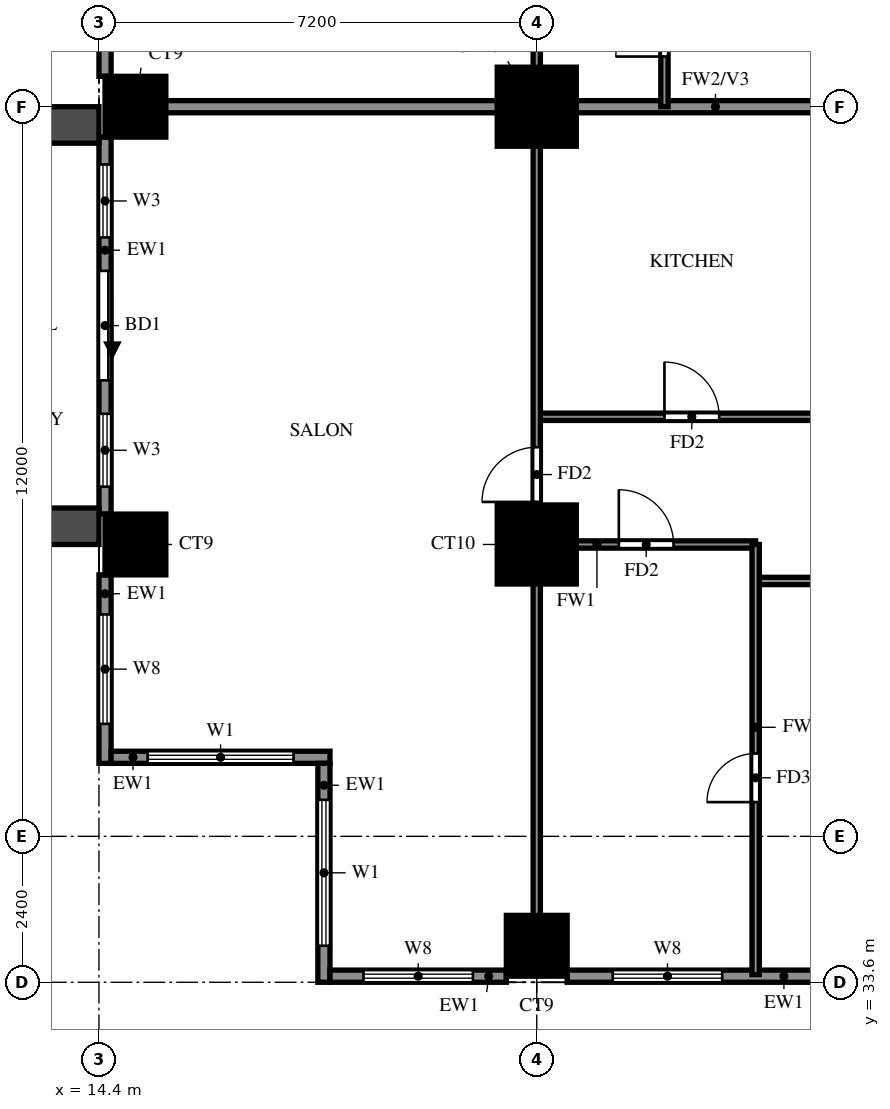
"""IFC4 building model, lengths in metres.
Left out: names, types, materials, properties, quantities, classifications, styles, units other than length and angle.
Written with IfcOpenShell. Run it as: python <this file> out.ifc"""

import sys

from ifc_helpers import new_model, si_unit, direction, frame, frame_2d, origin, origin_2d, place, context, subcontext, project, spatial, rectangle, extrude, source, transform, mapped, element, fill, save


model = new_model("IFC4")
c1 = context("Model", 3, precision=1e-05, world=origin(), true_north=direction((0.0, 1.0)))
c2 = subcontext(c1, "Body", "Model", "MODEL_VIEW")
j1 = project(units=[si_unit("LENGTHUNIT", "METRE"), si_unit("PLANEANGLEUNIT", "RADIAN")], contexts=[c1])
p1 = place(None, origin())
s1 = spatial("IfcSite", under=j1, at=p1, CompositionType="ELEMENT")
p2 = place(p1, origin())
s2 = spatial("IfcBuilding", under=s1, at=p2, CompositionType="ELEMENT")
p3 = place(p2, frame((0.0, 0.0, 90.0)))
s3 = spatial("IfcBuildingStorey", under=s2, at=p3, CompositionType="ELEMENT", Elevation=90.0)
m1 = source(origin(), c2, "Body", "SweptSolid", [
    extrude(rectangle(XDim=1.0, YDim=1.0, at=origin_2d()), origin(), (0.0, 0.0, 1.0), 3.18),
])
for number, where, z_axis, x_axis in (
    (1, (21.6, 34.2, 0.0), (0.0, 0.0, 1.0), (1.0, 0.0, 0.0)),
    (2, (15.0, 40.8, 0.0), (0.0, 0.0, 1.0), (1.0, 0.0, 0.0)),
):
    element("IfcColumn", number, at=place(p3, frame(where, z_axis=z_axis, x_axis=x_axis)), inside=s3, PredefinedType="COLUMN", context=c2, shape_type="MappedRepresentation", body=[
        mapped(m1, transform((0.0, 0.0, 0.0))),
    ])
m2 = source(origin(), c2, "Body", "SweptSolid", [
    extrude(rectangle(XDim=1.3, YDim=1.3, at=origin_2d()), origin(), (0.0, 0.0, 1.0), 3.18),
])
p4 = place(p3, frame((21.6, 40.8, 0.0), z_axis=(0.0, 0.0, 1.0), x_axis=(1.0, 0.0, 0.0)))
e3 = element("IfcColumn", 3, at=p4, inside=s3, PredefinedType="COLUMN", context=c2, shape_type="MappedRepresentation", body=[
    mapped(m2, transform((0.0, 0.0, 0.0))),
])
p5 = place(p3, frame((15.0, 48.0, 0.0), z_axis=(0.0, 0.0, 1.0), x_axis=(1.0, 0.0, 0.0)))
e4 = element("IfcColumn", 4, at=p5, inside=s3, PredefinedType="COLUMN", context=c2, shape_type="MappedRepresentation", body=[
    mapped(m1, transform((0.0, 0.0, 0.0))),
])
p6 = place(p3, frame((21.6, 48.0, 0.0), z_axis=(0.0, 0.0, 1.0), x_axis=(1.0, 0.0, 0.0)))
e5 = element("IfcColumn", 5, at=p6, inside=s3, PredefinedType="COLUMN", context=c2, shape_type="MappedRepresentation", body=[
    mapped(m2, transform((0.0, 0.0, 0.0))),
])
p7 = place(p3, frame((14.5, 54.7, 0.0), z_axis=(0.0, 0.0, 1.0), x_axis=(0.0, -1.0, 0.0)))
e6 = element("IfcWall", 6, at=p7, inside=s3, PredefinedType="SOLIDWALL", context=c2, shape_type="SweptSolid", body=[
    extrude(rectangle(XDim=6.2, YDim=0.2, at=frame_2d((3.1, 0.0))), origin(), (0.0, 0.0, 1.0), 3.18),
])
p8 = place(p7, frame((3.65, 0.0, 0.6)))
e7 = element("IfcOpeningElement", 7, at=p8, cuts=e6, PredefinedType="OPENING", context=c2, shape_type="SweptSolid", body=[
    extrude(rectangle(XDim=1.8, YDim=2.4, at=frame_2d((0.9, 1.2))), frame((0.0, 0.11, 0.0), z_axis=(0.0, -1.0, 0.0), x_axis=(1.0, 0.0, 0.0)), (0.0, 0.0, 1.0), 0.22),
])
p9 = place(p7, frame((0.75, 0.0, 0.6)))
e8 = element("IfcOpeningElement", 8, at=p9, cuts=e6, PredefinedType="OPENING", context=c2, shape_type="SweptSolid", body=[
    extrude(rectangle(XDim=1.8, YDim=2.4, at=frame_2d((0.9, 1.2))), frame((0.0, 0.11, 0.0), z_axis=(0.0, -1.0, 0.0), x_axis=(1.0, 0.0, 0.0)), (0.0, 0.0, 1.0), 0.22),
])
p10 = place(p3, frame((14.5, 47.5, 0.0), z_axis=(0.0, 0.0, 1.0), x_axis=(0.0, -1.0, 0.0)))
e9 = element("IfcWall", 9, at=p10, inside=s3, PredefinedType="SOLIDWALL", context=c2, shape_type="SweptSolid", body=[
    extrude(rectangle(XDim=6.2, YDim=0.2, at=frame_2d((3.1, 0.0))), origin(), (0.0, 0.0, 1.0), 3.18),
])
p11 = place(p10, frame((2.2, 0.0, 0.0)))
e10 = element("IfcOpeningElement", 10, at=p11, cuts=e9, PredefinedType="OPENING", context=c2, shape_type="SweptSolid", body=[
    extrude(rectangle(XDim=1.8, YDim=2.4, at=frame_2d((0.9, 1.2))), frame((0.0, 0.11, 0.0), z_axis=(0.0, -1.0, 0.0), x_axis=(1.0, 0.0, 0.0)), (0.0, 0.0, 1.0), 0.22),
])
p12 = place(p10, frame((0.45, 0.0, 0.6)))
e11 = element("IfcOpeningElement", 11, at=p12, cuts=e9, PredefinedType="OPENING", context=c2, shape_type="SweptSolid", body=[
    extrude(rectangle(XDim=1.2, YDim=2.4, at=frame_2d((0.6, 1.2))), frame((0.0, 0.11, 0.0), z_axis=(0.0, -1.0, 0.0), x_axis=(1.0, 0.0, 0.0)), (0.0, 0.0, 1.0), 0.22),
])
p13 = place(p10, frame((4.55, 0.0, 0.6)))
e12 = element("IfcOpeningElement", 12, at=p13, cuts=e9, PredefinedType="OPENING", context=c2, shape_type="SweptSolid", body=[
    extrude(rectangle(XDim=1.2, YDim=2.4, at=frame_2d((0.6, 1.2))), frame((0.0, 0.11, 0.0), z_axis=(0.0, -1.0, 0.0), x_axis=(1.0, 0.0, 0.0)), (0.0, 0.0, 1.0), 0.22),
])
p14 = place(p3, frame((14.5, 40.3, 0.0), z_axis=(0.0, 0.0, 1.0), x_axis=(0.0, -1.0, 0.0)))
e13 = element("IfcWall", 13, at=p14, inside=s3, PredefinedType="SOLIDWALL", context=c2, shape_type="SweptSolid", body=[
    extrude(rectangle(XDim=3.1, YDim=0.2, at=frame_2d((1.55, 0.0))), origin(), (0.0, 0.0, 1.0), 3.18),
])
p15 = place(p14, frame((0.65, 0.0, 0.6)))
e14 = element("IfcOpeningElement", 14, at=p15, cuts=e13, PredefinedType="OPENING", context=c2, shape_type="SweptSolid", body=[
    extrude(rectangle(XDim=1.8, YDim=2.4, at=frame_2d((0.9, 1.2))), frame((0.0, 0.11, 0.0), z_axis=(0.0, -1.0, 0.0), x_axis=(1.0, 0.0, 0.0)), (0.0, 0.0, 1.0), 0.22),
])
p16 = place(p3, frame((14.6, 37.3, 0.0), z_axis=(0.0, 0.0, 1.0), x_axis=(1.0, 0.0, 0.0)))
e15 = element("IfcWall", 15, at=p16, inside=s3, PredefinedType="SOLIDWALL", context=c2, shape_type="SweptSolid", body=[
    extrude(rectangle(XDim=3.6, YDim=0.2, at=frame_2d((1.8, 0.0))), origin(), (0.0, 0.0, 1.0), 3.18),
])
p17 = place(p16, frame((0.6, 0.0, 0.6)))
e16 = element("IfcOpeningElement", 16, at=p17, cuts=e15, PredefinedType="OPENING", context=c2, shape_type="SweptSolid", body=[
    extrude(rectangle(XDim=2.4, YDim=2.4, at=frame_2d((1.2, 1.2))), frame((0.0, 0.11, 0.0), z_axis=(0.0, -1.0, 0.0), x_axis=(1.0, 0.0, 0.0)), (0.0, 0.0, 1.0), 0.22),
])
p18 = place(p3, frame((18.1, 37.2, 0.0), z_axis=(0.0, 0.0, 1.0), x_axis=(0.0, -1.0, 0.0)))
e17 = element("IfcWall", 17, at=p18, inside=s3, PredefinedType="SOLIDWALL", context=c2, shape_type="SweptSolid", body=[
    extrude(rectangle(XDim=3.6, YDim=0.2, at=frame_2d((1.8, 0.0))), origin(), (0.0, 0.0, 1.0), 3.18),
])
p19 = place(p18, frame((0.6, 0.0, 0.6)))
e18 = element("IfcOpeningElement", 18, at=p19, cuts=e17, PredefinedType="OPENING", context=c2, shape_type="SweptSolid", body=[
    extrude(rectangle(XDim=2.4, YDim=2.4, at=frame_2d((1.2, 1.2))), frame((0.0, 0.11, 0.0), z_axis=(0.0, -1.0, 0.0), x_axis=(1.0, 0.0, 0.0)), (0.0, 0.0, 1.0), 0.22),
])
p20 = place(p3, frame((18.2, 33.7, 0.0), z_axis=(0.0, 0.0, 1.0), x_axis=(1.0, 0.0, 0.0)))
e19 = element("IfcWall", 19, at=p20, inside=s3, PredefinedType="SOLIDWALL", context=c2, shape_type="SweptSolid", body=[
    extrude(rectangle(XDim=2.9, YDim=0.2, at=frame_2d((1.45, 0.0))), origin(), (0.0, 0.0, 1.0), 3.18),
])
p21 = place(p20, frame((0.55, 0.0, 0.6)))
e20 = element("IfcOpeningElement", 20, at=p21, cuts=e19, PredefinedType="OPENING", context=c2, shape_type="SweptSolid", body=[
    extrude(rectangle(XDim=1.8, YDim=2.4, at=frame_2d((0.9, 1.2))), frame((0.0, 0.11, 0.0), z_axis=(0.0, -1.0, 0.0), x_axis=(1.0, 0.0, 0.0)), (0.0, 0.0, 1.0), 0.22),
])
p22 = place(p3, frame((22.1, 33.7, 0.0), z_axis=(0.0, 0.0, 1.0), x_axis=(1.0, 0.0, 0.0)))
e21 = element("IfcWall", 21, at=p22, inside=s3, PredefinedType="SOLIDWALL", context=c2, shape_type="SweptSolid", body=[
    extrude(rectangle(XDim=6.2, YDim=0.2, at=frame_2d((3.1, 0.0))), origin(), (0.0, 0.0, 1.0), 3.18),
])
p23 = place(p22, frame((0.75, 0.0, 0.6)))
e22 = element("IfcOpeningElement", 22, at=p23, cuts=e21, PredefinedType="OPENING", context=c2, shape_type="SweptSolid", body=[
    extrude(rectangle(XDim=1.8, YDim=2.4, at=frame_2d((0.9, 1.2))), frame((0.0, 0.11, 0.0), z_axis=(0.0, -1.0, 0.0), x_axis=(1.0, 0.0, 0.0)), (0.0, 0.0, 1.0), 0.22),
])
p24 = place(p22, frame((4.1, 0.0, 1.5)))
e23 = element("IfcOpeningElement", 23, at=p24, cuts=e21, PredefinedType="OPENING", context=c2, shape_type="SweptSolid", body=[
    extrude(rectangle(XDim=0.9, YDim=0.9, at=frame_2d((0.45, 0.45))), frame((0.0, 0.11, 0.0), z_axis=(0.0, -1.0, 0.0), x_axis=(1.0, 0.0, 0.0)), (0.0, 0.0, 1.0), 0.22),
])
for number, where, z_axis, x_axis in (
    (24, (14.4, 47.7, 0.0), (0.0, 0.0, 1.0), (-1.0, 0.0, 0.0)),
    (25, (14.4, 41.1, 0.0), (0.0, 0.0, 1.0), (-1.0, 0.0, 0.0)),
):
    element("IfcWall", number, at=place(p3, frame(where, z_axis=z_axis, x_axis=x_axis)), inside=s3, PredefinedType="SOLIDWALL", context=c2, shape_type="SweptSolid", body=[
        extrude(rectangle(XDim=2.7, YDim=0.6, at=frame_2d((1.35, 0.0))), origin(), (0.0, 0.0, 1.0), 2.85),
    ])
p25 = place(p3, frame((14.525, 48.0, 0.0), z_axis=(0.0, 0.0, 1.0), x_axis=(1.0, 0.0, 0.0)))
e26 = element("IfcWall", 26, at=p25, inside=s3, PredefinedType="SOLIDWALL", context=c2, shape_type="SweptSolid", body=[
    extrude(rectangle(XDim=19.075, YDim=0.2, at=frame_2d((9.538, 0.0))), origin(), (0.0, 0.0, 1.0), 3.18),
])
p26 = place(p3, frame((25.2, 40.2, 0.0), z_axis=(0.0, 0.0, 1.0), x_axis=(1.0, 0.0, 0.0)))
e27 = element("IfcWall", 27, at=p26, inside=s3, PredefinedType="PARTITIONING", context=c2, shape_type="SweptSolid", body=[
    extrude(rectangle(XDim=3.6, YDim=0.12, at=frame_2d((1.8, 0.0))), origin(), (0.0, 0.0, 1.0), 3.18),
])
p27 = place(p3, frame((21.6, 40.8, 0.0), z_axis=(0.0, 0.0, 1.0), x_axis=(1.0, 0.0, 0.0)))
e28 = element("IfcWall", 28, at=p27, inside=s3, PredefinedType="PARTITIONING", context=c2, shape_type="SweptSolid", body=[
    extrude(rectangle(XDim=3.6, YDim=0.12, at=frame_2d((1.8, 0.0))), origin(), (0.0, 0.0, 1.0), 3.18),
])
p28 = place(p27, frame((1.35, 0.0, 0.0)))
e29 = element("IfcOpeningElement", 29, at=p28, cuts=e28, PredefinedType="OPENING", context=c2, shape_type="SweptSolid", body=[
    extrude(rectangle(XDim=0.9, YDim=2.1, at=frame_2d((0.45, 1.05))), frame((0.0, 0.07, 0.0), z_axis=(0.0, -1.0, 0.0), x_axis=(1.0, 0.0, 0.0)), (0.0, 0.0, 1.0), 0.14),
])
p29 = place(p3, frame((21.6, 42.9, 0.0), z_axis=(0.0, 0.0, 1.0), x_axis=(1.0, 0.0, 0.0)))
e30 = element("IfcWall", 30, at=p29, inside=s3, PredefinedType="PARTITIONING", context=c2, shape_type="SweptSolid", body=[
    extrude(rectangle(XDim=14.4, YDim=0.12, at=frame_2d((7.2, 0.0))), origin(), (0.0, 0.0, 1.0), 3.18),
])
p30 = place(p29, frame((2.1, 0.0, 0.0)))
e31 = element("IfcOpeningElement", 31, at=p30, cuts=e30, PredefinedType="OPENING", context=c2, shape_type="SweptSolid", body=[
    extrude(rectangle(XDim=0.9, YDim=2.1, at=frame_2d((0.45, 1.05))), frame((0.0, 0.07, 0.0), z_axis=(0.0, -1.0, 0.0), x_axis=(1.0, 0.0, 0.0)), (0.0, 0.0, 1.0), 0.14),
])
p31 = place(p29, frame((5.85, 0.0, 0.0)))
e32 = element("IfcOpeningElement", 32, at=p31, cuts=e30, PredefinedType="OPENING", context=c2, shape_type="SweptSolid", body=[
    extrude(rectangle(XDim=0.8, YDim=2.1, at=frame_2d((0.4, 1.05))), frame((0.0, 0.07, 0.0), z_axis=(0.0, -1.0, 0.0), x_axis=(1.0, 0.0, 0.0)), (0.0, 0.0, 1.0), 0.14),
])
p32 = place(p29, frame((9.25, 0.0, 0.0)))
e33 = element("IfcOpeningElement", 33, at=p32, cuts=e30, PredefinedType="OPENING", context=c2, shape_type="SweptSolid", body=[
    extrude(rectangle(XDim=0.9, YDim=2.1, at=frame_2d((0.45, 1.05))), frame((0.0, 0.07, 0.0), z_axis=(0.0, -1.0, 0.0), x_axis=(1.0, 0.0, 0.0)), (0.0, 0.0, 1.0), 0.14),
])
p33 = place(p3, frame((21.6, 33.725, 0.0), z_axis=(0.0, 0.0, 1.0), x_axis=(0.0, 1.0, 0.0)))
e34 = element("IfcWall", 34, at=p33, inside=s3, PredefinedType="PARTITIONING", context=c2, shape_type="SweptSolid", body=[
    extrude(rectangle(XDim=32.275, YDim=0.12, at=frame_2d((16.137, 0.0))), origin(), (0.0, 0.0, 1.0), 3.18),
])
p34 = place(p33, frame((7.775, 0.0, 0.0)))
e35 = element("IfcOpeningElement", 35, at=p34, cuts=e34, PredefinedType="OPENING", context=c2, shape_type="SweptSolid", body=[
    extrude(rectangle(XDim=0.9, YDim=2.1, at=frame_2d((0.45, 1.05))), frame((0.0, 0.07, 0.0), z_axis=(0.0, -1.0, 0.0), x_axis=(1.0, 0.0, 0.0)), (0.0, 0.0, 1.0), 0.14),
])
p35 = place(p33, frame((15.625, 0.0, 0.0)))
e36 = element("IfcOpeningElement", 36, at=p35, cuts=e34, PredefinedType="OPENING", context=c2, shape_type="SweptSolid", body=[
    extrude(rectangle(XDim=0.9, YDim=2.1, at=frame_2d((0.45, 1.05))), frame((0.0, 0.07, 0.0), z_axis=(0.0, -1.0, 0.0), x_axis=(1.0, 0.0, 0.0)), (0.0, 0.0, 1.0), 0.14),
])
p36 = place(p33, frame((22.225, 0.0, 0.0)))
e37 = element("IfcOpeningElement", 37, at=p36, cuts=e34, PredefinedType="OPENING", context=c2, shape_type="SweptSolid", body=[
    extrude(rectangle(XDim=1.5, YDim=2.1, at=frame_2d((0.75, 1.05))), frame((0.0, 0.07, 0.0), z_axis=(0.0, -1.0, 0.0), x_axis=(1.0, 0.0, 0.0)), (0.0, 0.0, 1.0), 0.14),
])
p37 = place(p33, frame((26.425, 0.0, 0.0)))
e38 = element("IfcOpeningElement", 38, at=p37, cuts=e34, PredefinedType="OPENING", context=c2, shape_type="SweptSolid", body=[
    extrude(rectangle(XDim=0.9, YDim=2.1, at=frame_2d((0.45, 1.05))), frame((0.0, 0.07, 0.0), z_axis=(0.0, -1.0, 0.0), x_axis=(1.0, 0.0, 0.0)), (0.0, 0.0, 1.0), 0.14),
])
p38 = place(p33, frame((30.025, 0.0, 0.0)))
e39 = element("IfcOpeningElement", 39, at=p38, cuts=e34, PredefinedType="OPENING", context=c2, shape_type="SweptSolid", body=[
    extrude(rectangle(XDim=0.9, YDim=2.1, at=frame_2d((0.45, 1.05))), frame((0.0, 0.07, 0.0), z_axis=(0.0, -1.0, 0.0), x_axis=(1.0, 0.0, 0.0)), (0.0, 0.0, 1.0), 0.14),
])
p39 = place(p3, frame((23.7, 48.0, 0.0), z_axis=(0.0, 0.0, 1.0), x_axis=(0.0, 1.0, 0.0)))
e40 = element("IfcWall", 40, at=p39, inside=s3, PredefinedType="PARTITIONING", context=c2, shape_type="SweptSolid", body=[
    extrude(rectangle(XDim=7.2, YDim=0.12, at=frame_2d((3.6, 0.0))), origin(), (0.0, 0.0, 1.0), 3.18),
])
p40 = place(p39, frame((0.825, 0.0, 0.0)))
e41 = element("IfcOpeningElement", 41, at=p40, cuts=e40, PredefinedType="OPENING", context=c2, shape_type="SweptSolid", body=[
    extrude(rectangle(XDim=0.8, YDim=2.1, at=frame_2d((0.4, 1.05))), frame((0.0, 0.07, 0.0), z_axis=(0.0, -1.0, 0.0), x_axis=(1.0, 0.0, 0.0)), (0.0, 0.0, 1.0), 0.14),
])
p41 = place(p3, frame((25.2, 33.725, 0.0), z_axis=(0.0, 0.0, 1.0), x_axis=(0.0, 1.0, 0.0)))
e42 = element("IfcWall", 42, at=p41, inside=s3, PredefinedType="PARTITIONING", context=c2, shape_type="SweptSolid", body=[
    extrude(rectangle(XDim=7.075, YDim=0.12, at=frame_2d((3.538, 0.0))), origin(), (0.0, 0.0, 1.0), 2.28),
])
p42 = place(p41, frame((2.837, 0.0, 0.0)))
e43 = element("IfcOpeningElement", 43, at=p42, cuts=e42, PredefinedType="OPENING", context=c2, shape_type="SweptSolid", body=[
    extrude(rectangle(XDim=0.8, YDim=2.1, at=frame_2d((0.4, 1.05))), frame((0.0, 0.07, 0.0), z_axis=(0.0, -1.0, 0.0), x_axis=(1.0, 0.0, 0.0)), (0.0, 0.0, 1.0), 0.14),
])
p43 = place(p11, origin())
e44 = element("IfcDoor", 44, at=p43, inside=s3, OperationType="DOUBLE_DOOR_SLIDING", PredefinedType="DOOR", context=c2, shape_type="SweptSolid", body=[
    extrude(rectangle(XDim=1.8, YDim=2.4, at=frame_2d((0.9, 1.2))), frame((0.0, 0.025, 0.0), z_axis=(0.0, -1.0, 0.0), x_axis=(1.0, 0.0, 0.0)), (0.0, 0.0, 1.0), 0.05),
])
fill(e10, e44)
p44 = place(p12, origin())
e45 = element("IfcWindow", 45, at=p44, inside=s3, PartitioningType="SINGLE_PANEL", PredefinedType="WINDOW", context=c2, shape_type="SweptSolid", body=[
    extrude(rectangle(XDim=1.2, YDim=2.4, at=frame_2d((0.6, 1.2))), frame((0.0, 0.03, 0.0), z_axis=(0.0, -1.0, 0.0), x_axis=(1.0, 0.0, 0.0)), (0.0, 0.0, 1.0), 0.06),
])
fill(e11, e45)
p45 = place(p13, origin())
e46 = element("IfcWindow", 46, at=p45, inside=s3, PartitioningType="SINGLE_PANEL", PredefinedType="WINDOW", context=c2, shape_type="SweptSolid", body=[
    extrude(rectangle(XDim=1.2, YDim=2.4, at=frame_2d((0.6, 1.2))), frame((0.0, 0.03, 0.0), z_axis=(0.0, -1.0, 0.0), x_axis=(1.0, 0.0, 0.0)), (0.0, 0.0, 1.0), 0.06),
])
fill(e12, e46)
p46 = place(p15, origin())
e47 = element("IfcWindow", 47, at=p46, inside=s3, PartitioningType="DOUBLE_PANEL_VERTICAL", PredefinedType="WINDOW", context=c2, shape_type="SweptSolid", body=[
    extrude(rectangle(XDim=1.8, YDim=2.4, at=frame_2d((0.9, 1.2))), frame((0.0, 0.03, 0.0), z_axis=(0.0, -1.0, 0.0), x_axis=(1.0, 0.0, 0.0)), (0.0, 0.0, 1.0), 0.06),
])
fill(e14, e47)
p47 = place(p17, origin())
e48 = element("IfcWindow", 48, at=p47, inside=s3, PartitioningType="DOUBLE_PANEL_VERTICAL", PredefinedType="WINDOW", context=c2, shape_type="SweptSolid", body=[
    extrude(rectangle(XDim=2.4, YDim=2.4, at=frame_2d((1.2, 1.2))), frame((0.0, 0.03, 0.0), z_axis=(0.0, -1.0, 0.0), x_axis=(1.0, 0.0, 0.0)), (0.0, 0.0, 1.0), 0.06),
])
fill(e16, e48)
p48 = place(p19, origin())
e49 = element("IfcWindow", 49, at=p48, inside=s3, PartitioningType="DOUBLE_PANEL_VERTICAL", PredefinedType="WINDOW", context=c2, shape_type="SweptSolid", body=[
    extrude(rectangle(XDim=2.4, YDim=2.4, at=frame_2d((1.2, 1.2))), frame((0.0, 0.03, 0.0), z_axis=(0.0, -1.0, 0.0), x_axis=(1.0, 0.0, 0.0)), (0.0, 0.0, 1.0), 0.06),
])
fill(e18, e49)
p49 = place(p21, origin())
e50 = element("IfcWindow", 50, at=p49, inside=s3, PartitioningType="DOUBLE_PANEL_VERTICAL", PredefinedType="WINDOW", context=c2, shape_type="SweptSolid", body=[
    extrude(rectangle(XDim=1.8, YDim=2.4, at=frame_2d((0.9, 1.2))), frame((0.0, 0.03, 0.0), z_axis=(0.0, -1.0, 0.0), x_axis=(1.0, 0.0, 0.0)), (0.0, 0.0, 1.0), 0.06),
])
fill(e20, e50)
p50 = place(p23, origin())
e51 = element("IfcWindow", 51, at=p50, inside=s3, PartitioningType="DOUBLE_PANEL_VERTICAL", PredefinedType="WINDOW", context=c2, shape_type="SweptSolid", body=[
    extrude(rectangle(XDim=1.8, YDim=2.4, at=frame_2d((0.9, 1.2))), frame((0.0, 0.03, 0.0), z_axis=(0.0, -1.0, 0.0), x_axis=(1.0, 0.0, 0.0)), (0.0, 0.0, 1.0), 0.06),
])
fill(e22, e51)
p51 = place(p34, origin())
e52 = element("IfcDoor", 52, at=p51, inside=s3, OperationType="SINGLE_SWING_LEFT", PredefinedType="DOOR", context=c2, shape_type="SweptSolid", body=[
    extrude(rectangle(XDim=0.9, YDim=2.1, at=frame_2d((0.45, 1.05))), frame((0.0, 0.025, 0.0), z_axis=(0.0, -1.0, 0.0), x_axis=(1.0, 0.0, 0.0)), (0.0, 0.0, 1.0), 0.05),
])
fill(e35, e52)
p52 = place(p28, origin())
e53 = element("IfcDoor", 53, at=p52, inside=s3, OperationType="SINGLE_SWING_LEFT", PredefinedType="DOOR", context=c2, shape_type="SweptSolid", body=[
    extrude(rectangle(XDim=0.9, YDim=2.1, at=frame_2d((0.45, 1.05))), frame((0.0, 0.025, 0.0), z_axis=(0.0, -1.0, 0.0), x_axis=(1.0, 0.0, 0.0)), (0.0, 0.0, 1.0), 0.05),
])
fill(e29, e53)
p53 = place(p42, origin())
e54 = element("IfcDoor", 54, at=p53, inside=s3, OperationType="SINGLE_SWING_LEFT", PredefinedType="DOOR", context=c2, shape_type="SweptSolid", body=[
    extrude(rectangle(XDim=0.8, YDim=2.1, at=frame_2d((0.4, 1.05))), frame((0.0, 0.025, 0.0), z_axis=(0.0, -1.0, 0.0), x_axis=(1.0, 0.0, 0.0)), (0.0, 0.0, 1.0), 0.05),
])
fill(e43, e54)
p54 = place(p30, origin())
e55 = element("IfcDoor", 55, at=p54, inside=s3, OperationType="SINGLE_SWING_RIGHT", PredefinedType="DOOR", context=c2, shape_type="SweptSolid", body=[
    extrude(rectangle(XDim=0.9, YDim=2.1, at=frame_2d((0.45, 1.05))), frame((0.0, 0.025, 0.0), z_axis=(0.0, -1.0, 0.0), x_axis=(1.0, 0.0, 0.0)), (0.0, 0.0, 1.0), 0.05),
])
fill(e31, e55)
p55 = place(p40, origin())
e56 = element("IfcDoor", 56, at=p55, inside=s3, OperationType="SINGLE_SWING_RIGHT", PredefinedType="DOOR", context=c2, shape_type="SweptSolid", body=[
    extrude(rectangle(XDim=0.8, YDim=2.1, at=frame_2d((0.4, 1.05))), frame((0.0, 0.025, 0.0), z_axis=(0.0, -1.0, 0.0), x_axis=(1.0, 0.0, 0.0)), (0.0, 0.0, 1.0), 0.05),
])
fill(e41, e56)
save(model, sys.argv[1])
